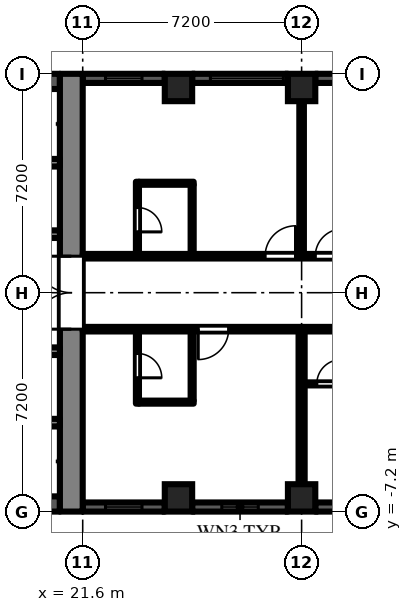
"""IFC4 building model, lengths in metres.
Left out: names, types, materials, properties, quantities, classifications, styles, units other than length and angle.
Written with IfcOpenShell. Run it as: python <this file> out.ifc"""

import sys

from ifc_helpers import new_model, si_unit, direction, frame, frame_2d, origin, origin_2d, place, context, subcontext, project, spatial, rectangle, extrude, element, fill, save


model = new_model("IFC4")
c1 = context("Model", 3, precision=1e-05, world=origin(), true_north=direction((0.0, 1.0)))
c2 = subcontext(c1, "Body", "Model", "MODEL_VIEW")
j1 = project(units=[si_unit("LENGTHUNIT", "METRE"), si_unit("PLANEANGLEUNIT", "RADIAN")], contexts=[c1])
p1 = place(None, origin())
s1 = spatial("IfcSite", under=j1, at=p1, CompositionType="ELEMENT")
p2 = place(p1, origin())
s2 = spatial("IfcBuilding", under=s1, at=p2, CompositionType="ELEMENT")
p3 = place(p2, frame((0.0, 0.0, 59.7)))
s3 = spatial("IfcBuildingStorey", under=s2, at=p3, CompositionType="ELEMENT", Elevation=59.7)
for number, where, z_axis, x_axis in (
    (1, (24.75, -6.75, 0.0), (0.0, 0.0, 1.0), (1.0, 0.0, 0.0)),
    (2, (24.75, 6.75, 0.0), (0.0, 0.0, 1.0), (1.0, 0.0, 0.0)),
    (3, (28.8, -6.75, 0.0), (0.0, 0.0, 1.0), (1.0, 0.0, 0.0)),
    (4, (28.8, 6.75, 0.0), (0.0, 0.0, 1.0), (1.0, 0.0, 0.0)),
):
    element("IfcColumn", number, at=place(p3, frame(where, z_axis=z_axis, x_axis=x_axis)), inside=s3, PredefinedType="COLUMN", context=c2, shape_type="SweptSolid", body=[
        extrude(rectangle(XDim=0.9, YDim=0.9, at=origin_2d()), origin(), (0.0, 0.0, 1.0), 3.0),
    ])
p4 = place(p3, frame((21.6, -7.05, 0.0), z_axis=(0.0, 0.0, 1.0), x_axis=(1.0, 0.0, 0.0)))
e5 = element("IfcWall", 5, at=p4, inside=s3, PredefinedType="SOLIDWALL", context=c2, shape_type="SweptSolid", body=[
    extrude(rectangle(XDim=2.7, YDim=0.3, at=frame_2d((1.35, 0.0))), origin(), (0.0, 0.0, 1.0), 2.1),
])
p5 = place(p4, frame((0.75, 0.0, 0.2)))
e6 = element("IfcOpeningElement", 6, at=p5, cuts=e5, PredefinedType="OPENING", context=c2, shape_type="SweptSolid", body=[
    extrude(rectangle(XDim=1.2, YDim=1.85, at=frame_2d((0.6, 0.925))), frame((0.0, 0.16, 0.0), z_axis=(0.0, -1.0, 0.0), x_axis=(1.0, 0.0, 0.0)), (0.0, 0.0, 1.0), 0.32),
])
p6 = place(p3, frame((25.2, -7.05, 0.0), z_axis=(0.0, 0.0, 1.0), x_axis=(1.0, 0.0, 0.0)))
e7 = element("IfcWall", 7, at=p6, inside=s3, PredefinedType="SOLIDWALL", context=c2, shape_type="SweptSolid", body=[
    extrude(rectangle(XDim=3.15, YDim=0.3, at=frame_2d((1.575, 0.0))), origin(), (0.0, 0.0, 1.0), 2.1),
])
p7 = place(p6, frame((0.975, 0.0, 0.2)))
e8 = element("IfcOpeningElement", 8, at=p7, cuts=e7, PredefinedType="OPENING", context=c2, shape_type="SweptSolid", body=[
    extrude(rectangle(XDim=1.2, YDim=1.85, at=frame_2d((0.6, 0.925))), frame((0.0, 0.16, 0.0), z_axis=(0.0, -1.0, 0.0), x_axis=(1.0, 0.0, 0.0)), (0.0, 0.0, 1.0), 0.32),
])
p8 = place(p3, frame((29.25, -7.05, 0.0), z_axis=(0.0, 0.0, 1.0), x_axis=(1.0, 0.0, 0.0)))
e9 = element("IfcWall", 9, at=p8, inside=s3, PredefinedType="SOLIDWALL", context=c2, shape_type="SweptSolid", body=[
    extrude(rectangle(XDim=6.3, YDim=0.3, at=frame_2d((3.15, 0.0))), origin(), (0.0, 0.0, 1.0), 2.1),
])
p9 = place(p8, frame((0.975, 0.0, 0.2)))
e10 = element("IfcOpeningElement", 10, at=p9, cuts=e9, PredefinedType="OPENING", context=c2, shape_type="SweptSolid", body=[
    extrude(rectangle(XDim=1.2, YDim=1.85, at=frame_2d((0.6, 0.925))), frame((0.0, 0.16, 0.0), z_axis=(0.0, -1.0, 0.0), x_axis=(1.0, 0.0, 0.0)), (0.0, 0.0, 1.0), 0.32),
])
p10 = place(p3, frame((35.55, 7.05, 0.0), z_axis=(0.0, 0.0, 1.0), x_axis=(-1.0, 0.0, 0.0)))
e11 = element("IfcWall", 11, at=p10, inside=s3, PredefinedType="SOLIDWALL", context=c2, shape_type="SweptSolid", body=[
    extrude(rectangle(XDim=6.3, YDim=0.3, at=frame_2d((3.15, 0.0))), origin(), (0.0, 0.0, 1.0), 2.1),
])
p11 = place(p10, frame((0.15, 0.0, 0.2)))
e12 = element("IfcOpeningElement", 12, at=p11, cuts=e11, PredefinedType="OPENING", context=c2, shape_type="SweptSolid", body=[
    extrude(rectangle(XDim=2.4, YDim=1.85, at=frame_2d((1.2, 0.925))), frame((0.0, 0.16, 0.0), z_axis=(0.0, -1.0, 0.0), x_axis=(1.0, 0.0, 0.0)), (0.0, 0.0, 1.0), 0.32),
])
p12 = place(p3, frame((28.35, 7.05, 0.0), z_axis=(0.0, 0.0, 1.0), x_axis=(-1.0, 0.0, 0.0)))
e13 = element("IfcWall", 13, at=p12, inside=s3, PredefinedType="SOLIDWALL", context=c2, shape_type="SweptSolid", body=[
    extrude(rectangle(XDim=3.15, YDim=0.3, at=frame_2d((1.575, 0.0))), origin(), (0.0, 0.0, 1.0), 2.1),
])
p13 = place(p12, frame((0.15, 0.0, 0.2)))
e14 = element("IfcOpeningElement", 14, at=p13, cuts=e13, PredefinedType="OPENING", context=c2, shape_type="SweptSolid", body=[
    extrude(rectangle(XDim=2.4, YDim=1.85, at=frame_2d((1.2, 0.925))), frame((0.0, 0.16, 0.0), z_axis=(0.0, -1.0, 0.0), x_axis=(1.0, 0.0, 0.0)), (0.0, 0.0, 1.0), 0.32),
])
p14 = place(p3, frame((24.3, 7.05, 0.0), z_axis=(0.0, 0.0, 1.0), x_axis=(-1.0, 0.0, 0.0)))
e15 = element("IfcWall", 15, at=p14, inside=s3, PredefinedType="SOLIDWALL", context=c2, shape_type="SweptSolid", body=[
    extrude(rectangle(XDim=2.7, YDim=0.3, at=frame_2d((1.35, 0.0))), origin(), (0.0, 0.0, 1.0), 2.1),
])
p15 = place(p14, frame((0.75, 0.0, 0.2)))
e16 = element("IfcOpeningElement", 16, at=p15, cuts=e15, PredefinedType="OPENING", context=c2, shape_type="SweptSolid", body=[
    extrude(rectangle(XDim=1.2, YDim=1.85, at=frame_2d((0.6, 0.925))), frame((0.0, 0.16, 0.0), z_axis=(0.0, -1.0, 0.0), x_axis=(1.0, 0.0, 0.0)), (0.0, 0.0, 1.0), 0.32),
])
p16 = place(p3, frame((21.225, -7.2, 0.0), z_axis=(0.0, 0.0, 1.0), x_axis=(0.0, 1.0, 0.0)))
e17 = element("IfcWall", 17, at=p16, inside=s3, PredefinedType="SHEAR", context=c2, shape_type="SweptSolid", body=[
    extrude(rectangle(XDim=14.4, YDim=0.75, at=frame_2d((7.2, 0.0))), origin(), (0.0, 0.0, 1.0), 2.55),
])
p17 = place(p16, frame((6.0, 0.0, 0.0)))
e18 = element("IfcOpeningElement", 18, at=p17, cuts=e17, PredefinedType="OPENING", context=c2, shape_type="SweptSolid", body=[
    extrude(rectangle(XDim=2.4, YDim=2.2, at=frame_2d((1.2, 1.1))), frame((0.0, 0.385, 0.0), z_axis=(0.0, -1.0, 0.0), x_axis=(1.0, 0.0, 0.0)), (0.0, 0.0, 1.0), 0.77),
])
p18 = place(p3, frame((7.9, 6.95, 0.0), z_axis=(0.0, 0.0, 1.0), x_axis=(1.0, 0.0, 0.0)))
e19 = element("IfcWall", 19, at=p18, inside=s3, PredefinedType="SHEAR", context=c2, shape_type="SweptSolid", body=[
    extrude(rectangle(XDim=12.95, YDim=0.5, at=frame_2d((6.475, 0.0))), origin(), (0.0, 0.0, 1.0), 2.55),
])
p19 = place(p3, frame((7.9, 1.925, 0.0), z_axis=(0.0, 0.0, 1.0), x_axis=(1.0, 0.0, 0.0)))
e20 = element("IfcWall", 20, at=p19, inside=s3, PredefinedType="SHEAR", context=c2, shape_type="SweptSolid", body=[
    extrude(rectangle(XDim=12.95, YDim=0.25, at=frame_2d((6.475, 0.0))), origin(), (0.0, 0.0, 1.0), 2.55),
])
p20 = place(p19, frame((0.525, 0.0, 0.0)))
e21 = element("IfcOpeningElement", 21, at=p20, cuts=e20, PredefinedType="OPENING", context=c2, shape_type="SweptSolid", body=[
    extrude(rectangle(XDim=0.9, YDim=2.1, at=frame_2d((0.45, 1.05))), frame((0.0, 0.135, 0.0), z_axis=(0.0, -1.0, 0.0), x_axis=(1.0, 0.0, 0.0)), (0.0, 0.0, 1.0), 0.27),
])
p21 = place(p19, frame((2.625, 0.0, 0.0)))
e22 = element("IfcOpeningElement", 22, at=p21, cuts=e20, PredefinedType="OPENING", context=c2, shape_type="SweptSolid", body=[
    extrude(rectangle(XDim=1.1, YDim=2.1, at=frame_2d((0.55, 1.05))), frame((0.0, 0.135, 0.0), z_axis=(0.0, -1.0, 0.0), x_axis=(1.0, 0.0, 0.0)), (0.0, 0.0, 1.0), 0.27),
])
p22 = place(p19, frame((6.025, 0.0, 0.0)))
e23 = element("IfcOpeningElement", 23, at=p22, cuts=e20, PredefinedType="OPENING", context=c2, shape_type="SweptSolid", body=[
    extrude(rectangle(XDim=0.9, YDim=2.1, at=frame_2d((0.45, 1.05))), frame((0.0, 0.135, 0.0), z_axis=(0.0, -1.0, 0.0), x_axis=(1.0, 0.0, 0.0)), (0.0, 0.0, 1.0), 0.27),
])
p23 = place(p19, frame((9.325, 0.0, 0.0)))
e24 = element("IfcOpeningElement", 24, at=p23, cuts=e20, PredefinedType="OPENING", context=c2, shape_type="SweptSolid", body=[
    extrude(rectangle(XDim=0.9, YDim=2.1, at=frame_2d((0.45, 1.05))), frame((0.0, 0.135, 0.0), z_axis=(0.0, -1.0, 0.0), x_axis=(1.0, 0.0, 0.0)), (0.0, 0.0, 1.0), 0.27),
])
p24 = place(p3, frame((12.3, 4.275, 0.0), z_axis=(0.0, 0.0, 1.0), x_axis=(1.0, 0.0, 0.0)))
e25 = element("IfcWall", 25, at=p24, inside=s3, PredefinedType="SHEAR", context=c2, shape_type="SweptSolid", body=[
    extrude(rectangle(XDim=8.55, YDim=0.25, at=frame_2d((4.275, 0.0))), origin(), (0.0, 0.0, 1.0), 2.55),
])
p25 = place(p3, frame((7.9, -6.95, 0.0), z_axis=(0.0, 0.0, 1.0), x_axis=(1.0, 0.0, 0.0)))
e26 = element("IfcWall", 26, at=p25, inside=s3, PredefinedType="SHEAR", context=c2, shape_type="SweptSolid", body=[
    extrude(rectangle(XDim=12.95, YDim=0.5, at=frame_2d((6.475, 0.0))), origin(), (0.0, 0.0, 1.0), 2.55),
])
p26 = place(p3, frame((7.9, -1.925, 0.0), z_axis=(0.0, 0.0, 1.0), x_axis=(1.0, 0.0, 0.0)))
e27 = element("IfcWall", 27, at=p26, inside=s3, PredefinedType="SHEAR", context=c2, shape_type="SweptSolid", body=[
    extrude(rectangle(XDim=12.95, YDim=0.25, at=frame_2d((6.475, 0.0))), origin(), (0.0, 0.0, 1.0), 2.55),
])
p27 = place(p26, frame((4.825, 0.0, 0.0)))
e28 = element("IfcOpeningElement", 28, at=p27, cuts=e27, PredefinedType="OPENING", context=c2, shape_type="SweptSolid", body=[
    extrude(rectangle(XDim=1.1, YDim=2.1, at=frame_2d((0.55, 1.05))), frame((0.0, 0.135, 0.0), z_axis=(0.0, -1.0, 0.0), x_axis=(1.0, 0.0, 0.0)), (0.0, 0.0, 1.0), 0.27),
])
p28 = place(p26, frame((7.025, 0.0, 0.0)))
e29 = element("IfcOpeningElement", 29, at=p28, cuts=e27, PredefinedType="OPENING", context=c2, shape_type="SweptSolid", body=[
    extrude(rectangle(XDim=1.1, YDim=2.1, at=frame_2d((0.55, 1.05))), frame((0.0, 0.135, 0.0), z_axis=(0.0, -1.0, 0.0), x_axis=(1.0, 0.0, 0.0)), (0.0, 0.0, 1.0), 0.27),
])
p29 = place(p26, frame((9.225, 0.0, 0.0)))
e30 = element("IfcOpeningElement", 30, at=p29, cuts=e27, PredefinedType="OPENING", context=c2, shape_type="SweptSolid", body=[
    extrude(rectangle(XDim=1.1, YDim=2.1, at=frame_2d((0.55, 1.05))), frame((0.0, 0.135, 0.0), z_axis=(0.0, -1.0, 0.0), x_axis=(1.0, 0.0, 0.0)), (0.0, 0.0, 1.0), 0.27),
])
p30 = place(p26, frame((0.525, 0.0, 0.0)))
e31 = element("IfcOpeningElement", 31, at=p30, cuts=e27, PredefinedType="OPENING", context=c2, shape_type="SweptSolid", body=[
    extrude(rectangle(XDim=0.9, YDim=2.1, at=frame_2d((0.45, 1.05))), frame((0.0, 0.135, 0.0), z_axis=(0.0, -1.0, 0.0), x_axis=(1.0, 0.0, 0.0)), (0.0, 0.0, 1.0), 0.27),
])
p31 = place(p26, frame((2.625, 0.0, 0.0)))
e32 = element("IfcOpeningElement", 32, at=p31, cuts=e27, PredefinedType="OPENING", context=c2, shape_type="SweptSolid", body=[
    extrude(rectangle(XDim=1.1, YDim=2.1, at=frame_2d((0.55, 1.05))), frame((0.0, 0.135, 0.0), z_axis=(0.0, -1.0, 0.0), x_axis=(1.0, 0.0, 0.0)), (0.0, 0.0, 1.0), 0.27),
])
p32 = place(p3, frame((12.3, -4.275, 0.0), z_axis=(0.0, 0.0, 1.0), x_axis=(1.0, 0.0, 0.0)))
e33 = element("IfcWall", 33, at=p32, inside=s3, PredefinedType="SHEAR", context=c2, shape_type="SweptSolid", body=[
    extrude(rectangle(XDim=8.55, YDim=0.25, at=frame_2d((4.275, 0.0))), origin(), (0.0, 0.0, 1.0), 2.55),
])
p33 = place(p3, frame((21.6, -1.2, 0.0), z_axis=(0.0, 0.0, 1.0), x_axis=(1.0, 0.0, 0.0)))
e34 = element("IfcWall", 34, at=p33, inside=s3, PredefinedType="PARTITIONING", context=c2, shape_type="SweptSolid", body=[
    extrude(rectangle(XDim=14.9, YDim=0.15, at=frame_2d((7.45, 0.0))), origin(), (0.0, 0.0, 1.0), 2.55),
])
p34 = place(p33, frame((3.8, 0.0, 0.0)))
e35 = element("IfcOpeningElement", 35, at=p34, cuts=e34, PredefinedType="OPENING", context=c2, shape_type="SweptSolid", body=[
    extrude(rectangle(XDim=1.0, YDim=2.1, at=frame_2d((0.5, 1.05))), frame((0.0, 0.085, 0.0), z_axis=(0.0, -1.0, 0.0), x_axis=(1.0, 0.0, 0.0)), (0.0, 0.0, 1.0), 0.17),
])
p35 = place(p33, frame((9.2, 0.0, 0.0)))
e36 = element("IfcOpeningElement", 36, at=p35, cuts=e34, PredefinedType="OPENING", context=c2, shape_type="SweptSolid", body=[
    extrude(rectangle(XDim=1.0, YDim=2.1, at=frame_2d((0.5, 1.05))), frame((0.0, 0.085, 0.0), z_axis=(0.0, -1.0, 0.0), x_axis=(1.0, 0.0, 0.0)), (0.0, 0.0, 1.0), 0.17),
])
p36 = place(p33, frame((11.95, 0.0, 0.0)))
e37 = element("IfcOpeningElement", 37, at=p36, cuts=e34, PredefinedType="OPENING", context=c2, shape_type="SweptSolid", body=[
    extrude(rectangle(XDim=1.8, YDim=2.1, at=frame_2d((0.9, 1.05))), frame((0.0, 0.085, 0.0), z_axis=(0.0, -1.0, 0.0), x_axis=(1.0, 0.0, 0.0)), (0.0, 0.0, 1.0), 0.17),
])
p37 = place(p3, frame((21.6, 1.2, 0.0), z_axis=(0.0, 0.0, 1.0), x_axis=(1.0, 0.0, 0.0)))
e38 = element("IfcWall", 38, at=p37, inside=s3, PredefinedType="PARTITIONING", context=c2, shape_type="SweptSolid", body=[
    extrude(rectangle(XDim=14.9, YDim=0.15, at=frame_2d((7.45, 0.0))), origin(), (0.0, 0.0, 1.0), 2.55),
])
p38 = place(p37, frame((6.0, 0.0, 0.0)))
e39 = element("IfcOpeningElement", 39, at=p38, cuts=e38, PredefinedType="OPENING", context=c2, shape_type="SweptSolid", body=[
    extrude(rectangle(XDim=1.0, YDim=2.1, at=frame_2d((0.5, 1.05))), frame((0.0, 0.085, 0.0), z_axis=(0.0, -1.0, 0.0), x_axis=(1.0, 0.0, 0.0)), (0.0, 0.0, 1.0), 0.17),
])
p39 = place(p37, frame((7.65, 0.0, 0.0)))
e40 = element("IfcOpeningElement", 40, at=p39, cuts=e38, PredefinedType="OPENING", context=c2, shape_type="SweptSolid", body=[
    extrude(rectangle(XDim=0.9, YDim=2.1, at=frame_2d((0.45, 1.05))), frame((0.0, 0.085, 0.0), z_axis=(0.0, -1.0, 0.0), x_axis=(1.0, 0.0, 0.0)), (0.0, 0.0, 1.0), 0.17),
])
p40 = place(p37, frame((9.45, 0.0, 0.0)))
e41 = element("IfcOpeningElement", 41, at=p40, cuts=e38, PredefinedType="OPENING", context=c2, shape_type="SweptSolid", body=[
    extrude(rectangle(XDim=0.9, YDim=2.1, at=frame_2d((0.45, 1.05))), frame((0.0, 0.085, 0.0), z_axis=(0.0, -1.0, 0.0), x_axis=(1.0, 0.0, 0.0)), (0.0, 0.0, 1.0), 0.17),
])
p41 = place(p37, frame((11.95, 0.0, 0.0)))
e42 = element("IfcOpeningElement", 42, at=p41, cuts=e38, PredefinedType="OPENING", context=c2, shape_type="SweptSolid", body=[
    extrude(rectangle(XDim=1.8, YDim=2.1, at=frame_2d((0.9, 1.05))), frame((0.0, 0.085, 0.0), z_axis=(0.0, -1.0, 0.0), x_axis=(1.0, 0.0, 0.0)), (0.0, 0.0, 1.0), 0.17),
])
p42 = place(p3, frame((23.4, -3.65, 0.0), z_axis=(0.0, 0.0, 1.0), x_axis=(0.0, 1.0, 0.0)))
e43 = element("IfcWall", 43, at=p42, inside=s3, PredefinedType="PARTITIONING", context=c2, shape_type="SweptSolid", body=[
    extrude(rectangle(XDim=2.375, YDim=0.1, at=frame_2d((1.188, 0.0))), origin(), (0.0, 0.0, 1.0), 2.55),
])
p43 = place(p42, frame((0.85, 0.0, 0.0)))
e44 = element("IfcOpeningElement", 44, at=p43, cuts=e43, PredefinedType="OPENING", context=c2, shape_type="SweptSolid", body=[
    extrude(rectangle(XDim=0.8, YDim=2.1, at=frame_2d((0.4, 1.05))), frame((0.0, 0.06, 0.0), z_axis=(0.0, -1.0, 0.0), x_axis=(1.0, 0.0, 0.0)), (0.0, 0.0, 1.0), 0.12),
])
p44 = place(p3, frame((23.45, -3.6, 0.0), z_axis=(0.0, 0.0, 1.0), x_axis=(1.0, 0.0, 0.0)))
e45 = element("IfcWall", 45, at=p44, inside=s3, PredefinedType="PARTITIONING", context=c2, shape_type="SweptSolid", body=[
    extrude(rectangle(XDim=1.8, YDim=0.1, at=frame_2d((0.9, 0.0))), origin(), (0.0, 0.0, 1.0), 2.55),
])
p45 = place(p3, frame((23.4, 1.275, 0.0), z_axis=(0.0, 0.0, 1.0), x_axis=(0.0, 1.0, 0.0)))
e46 = element("IfcWall", 46, at=p45, inside=s3, PredefinedType="PARTITIONING", context=c2, shape_type="SweptSolid", body=[
    extrude(rectangle(XDim=2.375, YDim=0.1, at=frame_2d((1.188, 0.0))), origin(), (0.0, 0.0, 1.0), 2.55),
])
p46 = place(p45, frame((0.725, 0.0, 0.0)))
e47 = element("IfcOpeningElement", 47, at=p46, cuts=e46, PredefinedType="OPENING", context=c2, shape_type="SweptSolid", body=[
    extrude(rectangle(XDim=0.8, YDim=2.1, at=frame_2d((0.4, 1.05))), frame((0.0, 0.06, 0.0), z_axis=(0.0, -1.0, 0.0), x_axis=(1.0, 0.0, 0.0)), (0.0, 0.0, 1.0), 0.12),
])
p47 = place(p3, frame((23.45, 3.6, 0.0), z_axis=(0.0, 0.0, 1.0), x_axis=(1.0, 0.0, 0.0)))
e48 = element("IfcWall", 48, at=p47, inside=s3, PredefinedType="PARTITIONING", context=c2, shape_type="SweptSolid", body=[
    extrude(rectangle(XDim=1.8, YDim=0.1, at=frame_2d((0.9, 0.0))), origin(), (0.0, 0.0, 1.0), 2.55),
])
for number, where, z_axis, x_axis in (
    (49, (25.2, -3.55, 0.0), (0.0, 0.0, 1.0), (0.0, 1.0, 0.0)),
    (50, (25.2, 1.275, 0.0), (0.0, 0.0, 1.0), (0.0, 1.0, 0.0)),
):
    element("IfcWall", number, at=place(p3, frame(where, z_axis=z_axis, x_axis=x_axis)), inside=s3, PredefinedType="PARTITIONING", context=c2, shape_type="SweptSolid", body=[
        extrude(rectangle(XDim=2.275, YDim=0.1, at=frame_2d((1.138, 0.0))), origin(), (0.0, 0.0, 1.0), 2.55),
    ])
p48 = place(p3, frame((28.8, -6.9, 0.0), z_axis=(0.0, 0.0, 1.0), x_axis=(0.0, 1.0, 0.0)))
e51 = element("IfcWall", 51, at=p48, inside=s3, PredefinedType="PARTITIONING", context=c2, shape_type="SweptSolid", body=[
    extrude(rectangle(XDim=5.625, YDim=0.2, at=frame_2d((2.812, 0.0))), origin(), (0.0, 0.0, 1.0), 2.55),
])
p49 = place(p3, frame((28.9, -3.0, 0.0), z_axis=(0.0, 0.0, 1.0), x_axis=(1.0, 0.0, 0.0)))
e52 = element("IfcWall", 52, at=p49, inside=s3, PredefinedType="PARTITIONING", context=c2, shape_type="SweptSolid", body=[
    extrude(rectangle(XDim=1.75, YDim=0.1, at=frame_2d((0.875, 0.0))), origin(), (0.0, 0.0, 1.0), 2.55),
])
p50 = place(p49, frame((0.4, 0.0, 0.0)))
e53 = element("IfcOpeningElement", 53, at=p50, cuts=e52, PredefinedType="OPENING", context=c2, shape_type="SweptSolid", body=[
    extrude(rectangle(XDim=0.8, YDim=2.1, at=frame_2d((0.4, 1.05))), frame((0.0, 0.06, 0.0), z_axis=(0.0, -1.0, 0.0), x_axis=(1.0, 0.0, 0.0)), (0.0, 0.0, 1.0), 0.12),
])
p51 = place(p3, frame((28.8, 1.275, 0.0), z_axis=(0.0, 0.0, 1.0), x_axis=(0.0, 1.0, 0.0)))
e54 = element("IfcWall", 54, at=p51, inside=s3, PredefinedType="PARTITIONING", context=c2, shape_type="SweptSolid", body=[
    extrude(rectangle(XDim=5.625, YDim=0.15, at=frame_2d((2.812, 0.0))), origin(), (0.0, 0.0, 1.0), 2.55),
])
p52 = place(p5, origin())
e55 = element("IfcWindow", 55, at=p52, inside=s3, PartitioningType="SINGLE_PANEL", PredefinedType="WINDOW", context=c2, shape_type="SweptSolid", body=[
    extrude(rectangle(XDim=1.2, YDim=1.85, at=frame_2d((0.6, 0.925))), frame((0.0, 0.03, 0.0), z_axis=(0.0, -1.0, 0.0), x_axis=(1.0, 0.0, 0.0)), (0.0, 0.0, 1.0), 0.06),
])
fill(e6, e55)
p53 = place(p7, origin())
e56 = element("IfcWindow", 56, at=p53, inside=s3, PartitioningType="SINGLE_PANEL", PredefinedType="WINDOW", context=c2, shape_type="SweptSolid", body=[
    extrude(rectangle(XDim=1.2, YDim=1.85, at=frame_2d((0.6, 0.925))), frame((0.0, 0.03, 0.0), z_axis=(0.0, -1.0, 0.0), x_axis=(1.0, 0.0, 0.0)), (0.0, 0.0, 1.0), 0.06),
])
fill(e8, e56)
p54 = place(p13, origin())
e57 = element("IfcWindow", 57, at=p54, inside=s3, PartitioningType="SINGLE_PANEL", PredefinedType="WINDOW", context=c2, shape_type="SweptSolid", body=[
    extrude(rectangle(XDim=2.4, YDim=1.85, at=frame_2d((1.2, 0.925))), frame((0.0, 0.03, 0.0), z_axis=(0.0, -1.0, 0.0), x_axis=(1.0, 0.0, 0.0)), (0.0, 0.0, 1.0), 0.06),
])
fill(e14, e57)
p55 = place(p15, origin())
e58 = element("IfcWindow", 58, at=p55, inside=s3, PartitioningType="SINGLE_PANEL", PredefinedType="WINDOW", context=c2, shape_type="SweptSolid", body=[
    extrude(rectangle(XDim=1.2, YDim=1.85, at=frame_2d((0.6, 0.925))), frame((0.0, 0.03, 0.0), z_axis=(0.0, -1.0, 0.0), x_axis=(1.0, 0.0, 0.0)), (0.0, 0.0, 1.0), 0.06),
])
fill(e16, e58)
p56 = place(p17, origin())
e59 = element("IfcDoor", 59, at=p56, inside=s3, OperationType="DOUBLE_DOOR_DOUBLE_SWING", PredefinedType="DOOR", context=c2, shape_type="SweptSolid", body=[
    extrude(rectangle(XDim=2.4, YDim=2.2, at=frame_2d((1.2, 1.1))), frame((0.0, 0.025, 0.0), z_axis=(0.0, -1.0, 0.0), x_axis=(1.0, 0.0, 0.0)), (0.0, 0.0, 1.0), 0.05),
])
fill(e18, e59)
p57 = place(p46, frame((0.8, 0.0, 0.0), z_axis=(0.0, 0.0, 1.0), x_axis=(-1.0, 0.0, 0.0)))
e60 = element("IfcDoor", 60, at=p57, inside=s3, OperationType="SINGLE_SWING_RIGHT", PredefinedType="DOOR", context=c2, shape_type="SweptSolid", body=[
    extrude(rectangle(XDim=0.8, YDim=2.1, at=frame_2d((0.4, 1.05))), frame((0.0, 0.025, 0.0), z_axis=(0.0, -1.0, 0.0), x_axis=(1.0, 0.0, 0.0)), (0.0, 0.0, 1.0), 0.05),
])
fill(e47, e60)
p58 = place(p38, origin())
e61 = element("IfcDoor", 61, at=p58, inside=s3, OperationType="SINGLE_SWING_RIGHT", PredefinedType="DOOR", context=c2, shape_type="SweptSolid", body=[
    extrude(rectangle(XDim=1.0, YDim=2.1, at=frame_2d((0.5, 1.05))), frame((0.0, 0.025, 0.0), z_axis=(0.0, -1.0, 0.0), x_axis=(1.0, 0.0, 0.0)), (0.0, 0.0, 1.0), 0.05),
])
fill(e39, e61)
p59 = place(p39, origin())
e62 = element("IfcDoor", 62, at=p59, inside=s3, OperationType="SINGLE_SWING_RIGHT", PredefinedType="DOOR", context=c2, shape_type="SweptSolid", body=[
    extrude(rectangle(XDim=0.9, YDim=2.1, at=frame_2d((0.45, 1.05))), frame((0.0, 0.025, 0.0), z_axis=(0.0, -1.0, 0.0), x_axis=(1.0, 0.0, 0.0)), (0.0, 0.0, 1.0), 0.05),
])
fill(e40, e62)
p60 = place(p43, frame((0.8, 0.0, 0.0), z_axis=(0.0, 0.0, 1.0), x_axis=(-1.0, 0.0, 0.0)))
e63 = element("IfcDoor", 63, at=p60, inside=s3, OperationType="SINGLE_SWING_RIGHT", PredefinedType="DOOR", context=c2, shape_type="SweptSolid", body=[
    extrude(rectangle(XDim=0.8, YDim=2.1, at=frame_2d((0.4, 1.05))), frame((0.0, 0.025, 0.0), z_axis=(0.0, -1.0, 0.0), x_axis=(1.0, 0.0, 0.0)), (0.0, 0.0, 1.0), 0.05),
])
fill(e44, e63)
p61 = place(p34, frame((1.0, 0.0, 0.0), z_axis=(0.0, 0.0, 1.0), x_axis=(-1.0, 0.0, 0.0)))
e64 = element("IfcDoor", 64, at=p61, inside=s3, OperationType="SINGLE_SWING_RIGHT", PredefinedType="DOOR", context=c2, shape_type="SweptSolid", body=[
    extrude(rectangle(XDim=1.0, YDim=2.1, at=frame_2d((0.5, 1.05))), frame((0.0, 0.025, 0.0), z_axis=(0.0, -1.0, 0.0), x_axis=(1.0, 0.0, 0.0)), (0.0, 0.0, 1.0), 0.05),
])
fill(e35, e64)
p62 = place(p50, origin())
e65 = element("IfcDoor", 65, at=p62, inside=s3, OperationType="SINGLE_SWING_RIGHT", PredefinedType="DOOR", context=c2, shape_type="SweptSolid", body=[
    extrude(rectangle(XDim=0.8, YDim=2.1, at=frame_2d((0.4, 1.05))), frame((0.0, 0.025, 0.0), z_axis=(0.0, -1.0, 0.0), x_axis=(1.0, 0.0, 0.0)), (0.0, 0.0, 1.0), 0.05),
])
fill(e53, e65)
save(model, sys.argv[1])
